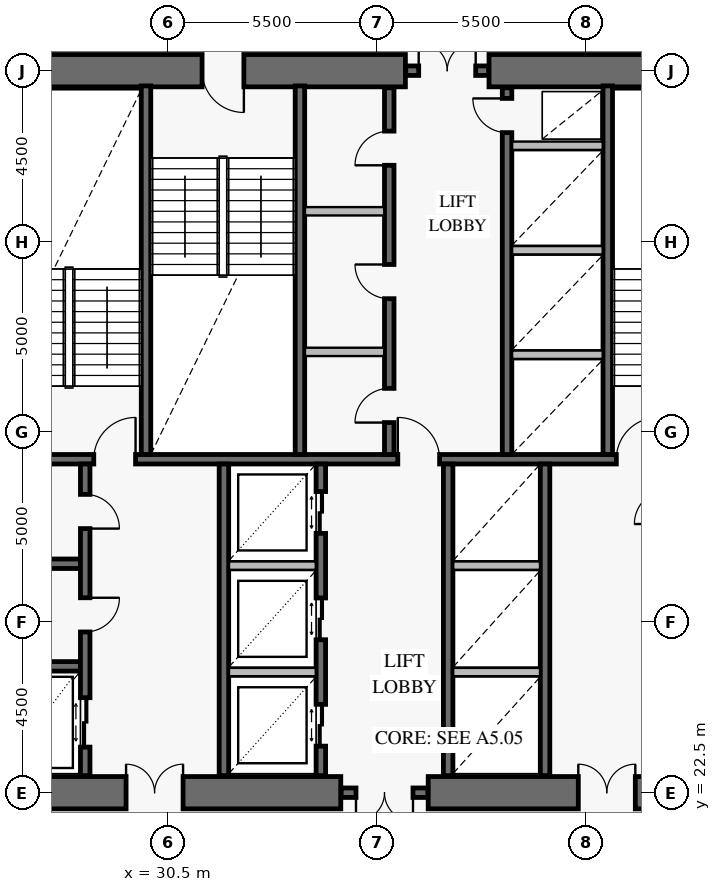
"""IFC4 building model, lengths in metres.
Left out: names, types, materials, properties, quantities, classifications, styles, units other than length and angle.
Written with IfcOpenShell. Run it as: python <this file> out.ifc"""

import sys

from ifc_helpers import new_model, si_unit, direction, frame, frame_2d, origin, place, context, subcontext, project, spatial, rectangle, extrude, element, fill, save


model = new_model("IFC4")
c1 = context("Model", 3, precision=1e-05, world=origin(), true_north=direction((0.0, 1.0)))
c2 = subcontext(c1, "Body", "Model", "MODEL_VIEW")
j1 = project(units=[si_unit("LENGTHUNIT", "METRE"), si_unit("PLANEANGLEUNIT", "RADIAN")], contexts=[c1])
p1 = place(None, origin())
s1 = spatial("IfcSite", under=j1, at=p1, CompositionType="ELEMENT")
p2 = place(p1, origin())
s2 = spatial("IfcBuilding", under=s1, at=p2, CompositionType="ELEMENT")
p3 = place(p2, frame((0.0, 0.0, 54.0)))
s3 = spatial("IfcBuildingStorey", under=s2, at=p3, CompositionType="ELEMENT", Elevation=54.0)
p4 = place(p3, frame((25.075, 22.5, 0.0), z_axis=(0.0, 0.0, 1.0), x_axis=(1.0, 0.0, 0.0)))
e1 = element("IfcWall", 1, at=p4, inside=s3, PredefinedType="SHEAR", context=c2, shape_type="SweptSolid", body=[
    extrude(rectangle(XDim=9.975, YDim=0.85, at=frame_2d((4.988, 0.0))), origin(), (0.0, 0.0, 1.0), 4.2),
])
p5 = place(p4, frame((4.325, 0.0, 0.0)))
e2 = element("IfcOpeningElement", 2, at=p5, cuts=e1, PredefinedType="OPENING", context=c2, shape_type="SweptSolid", body=[
    extrude(rectangle(XDim=1.5, YDim=2.15, at=frame_2d((0.75, 1.075))), frame((0.0, 0.437, 0.0), z_axis=(0.0, -1.0, 0.0), x_axis=(1.0, 0.0, 0.0)), (0.0, 0.0, 1.0), 0.874),
])
p6 = place(p3, frame((37.35, 22.5, 0.0), z_axis=(0.0, 0.0, 1.0), x_axis=(1.0, 0.0, 0.0)))
e3 = element("IfcWall", 3, at=p6, inside=s3, PredefinedType="SHEAR", context=c2, shape_type="SweptSolid", body=[
    extrude(rectangle(XDim=9.575, YDim=0.85, at=frame_2d((4.788, 0.0))), origin(), (0.0, 0.0, 1.0), 4.2),
])
p7 = place(p6, frame((3.95, 0.0, 0.0)))
e4 = element("IfcOpeningElement", 4, at=p7, cuts=e3, PredefinedType="OPENING", context=c2, shape_type="SweptSolid", body=[
    extrude(rectangle(XDim=1.5, YDim=2.15, at=frame_2d((0.75, 1.075))), frame((0.0, 0.437, 0.0), z_axis=(0.0, -1.0, 0.0), x_axis=(1.0, 0.0, 0.0)), (0.0, 0.0, 1.0), 0.874),
])
p8 = place(p3, frame((46.925, 41.5, 0.0), z_axis=(0.0, 0.0, 1.0), x_axis=(-1.0, 0.0, 0.0)))
e5 = element("IfcWall", 5, at=p8, inside=s3, PredefinedType="SHEAR", context=c2, shape_type="SweptSolid", body=[
    extrude(rectangle(XDim=7.975, YDim=0.85, at=frame_2d((3.988, 0.0))), origin(), (0.0, 0.0, 1.0), 4.2),
])
p9 = place(p3, frame((36.75, 41.5, 0.0), z_axis=(0.0, 0.0, 1.0), x_axis=(-1.0, 0.0, 0.0)))
e6 = element("IfcWall", 6, at=p9, inside=s3, PredefinedType="SHEAR", context=c2, shape_type="SweptSolid", body=[
    extrude(rectangle(XDim=11.675, YDim=0.85, at=frame_2d((5.837, 0.0))), origin(), (0.0, 0.0, 1.0), 4.2),
])
p10 = place(p9, frame((4.25, 0.0, 0.0)))
e7 = element("IfcOpeningElement", 7, at=p10, cuts=e6, PredefinedType="OPENING", context=c2, shape_type="SweptSolid", body=[
    extrude(rectangle(XDim=1.1, YDim=2.15, at=frame_2d((0.55, 1.075))), frame((0.0, 0.437, 0.0), z_axis=(0.0, -1.0, 0.0), x_axis=(1.0, 0.0, 0.0)), (0.0, 0.0, 1.0), 0.874),
])
p11 = place(p3, frame((35.06, 22.5, 0.0), z_axis=(0.0, 0.0, 1.0), x_axis=(1.0, 0.0, 0.0)))
e8 = element("IfcWall", 8, at=p11, inside=s3, PredefinedType="SOLIDWALL", context=c2, shape_type="SweptSolid", body=[
    extrude(rectangle(XDim=2.28, YDim=0.25, at=frame_2d((1.14, 0.0))), origin(), (0.0, 0.0, 1.0), 4.2),
])
p12 = place(p11, frame((0.39, 0.0, 0.0)))
e9 = element("IfcOpeningElement", 9, at=p12, cuts=e8, PredefinedType="OPENING", context=c2, shape_type="SweptSolid", body=[
    extrude(rectangle(XDim=1.5, YDim=2.15, at=frame_2d((0.75, 1.075))), frame((0.0, 0.137, 0.0), z_axis=(0.0, -1.0, 0.0), x_axis=(1.0, 0.0, 0.0)), (0.0, 0.0, 1.0), 0.274),
])
p13 = place(p3, frame((36.76, 41.5, 0.0), z_axis=(0.0, 0.0, 1.0), x_axis=(1.0, 0.0, 0.0)))
e10 = element("IfcWall", 10, at=p13, inside=s3, PredefinedType="SOLIDWALL", context=c2, shape_type="SweptSolid", body=[
    extrude(rectangle(XDim=2.18, YDim=0.25, at=frame_2d((1.09, 0.0))), origin(), (0.0, 0.0, 1.0), 4.2),
])
p14 = place(p13, frame((0.34, 0.0, 0.0)))
e11 = element("IfcOpeningElement", 11, at=p14, cuts=e10, PredefinedType="OPENING", context=c2, shape_type="SweptSolid", body=[
    extrude(rectangle(XDim=1.5, YDim=2.15, at=frame_2d((0.75, 1.075))), frame((0.0, 0.137, 0.0), z_axis=(0.0, -1.0, 0.0), x_axis=(1.0, 0.0, 0.0)), (0.0, 0.0, 1.0), 0.274),
])
p15 = place(p3, frame((25.95, 31.275, 0.0), z_axis=(0.0, 0.0, 1.0), x_axis=(1.0, 0.0, 0.0)))
e12 = element("IfcWall", 12, at=p15, inside=s3, PredefinedType="SOLIDWALL", context=c2, shape_type="SweptSolid", body=[
    extrude(rectangle(XDim=20.1, YDim=0.25, at=frame_2d((10.05, 0.0))), origin(), (0.0, 0.0, 1.0), 4.2),
])
p16 = place(p15, frame((2.6, 0.0, 0.0)))
e13 = element("IfcOpeningElement", 13, at=p16, cuts=e12, PredefinedType="OPENING", context=c2, shape_type="SweptSolid", body=[
    extrude(rectangle(XDim=1.1, YDim=2.15, at=frame_2d((0.55, 1.075))), frame((0.0, 0.137, 0.0), z_axis=(0.0, -1.0, 0.0), x_axis=(1.0, 0.0, 0.0)), (0.0, 0.0, 1.0), 0.274),
])
p17 = place(p15, frame((10.6, 0.0, 0.0)))
e14 = element("IfcOpeningElement", 14, at=p17, cuts=e12, PredefinedType="OPENING", context=c2, shape_type="SweptSolid", body=[
    extrude(rectangle(XDim=1.1, YDim=2.15, at=frame_2d((0.55, 1.075))), frame((0.0, 0.137, 0.0), z_axis=(0.0, -1.0, 0.0), x_axis=(1.0, 0.0, 0.0)), (0.0, 0.0, 1.0), 0.274),
])
p18 = place(p15, frame((16.35, 0.0, 0.0)))
e15 = element("IfcOpeningElement", 15, at=p18, cuts=e12, PredefinedType="OPENING", context=c2, shape_type="SweptSolid", body=[
    extrude(rectangle(XDim=1.1, YDim=2.15, at=frame_2d((0.55, 1.075))), frame((0.0, 0.137, 0.0), z_axis=(0.0, -1.0, 0.0), x_axis=(1.0, 0.0, 0.0)), (0.0, 0.0, 1.0), 0.274),
])
for number, where, z_axis, x_axis in (
    (16, (29.925, 31.4, 0.0), (0.0, 0.0, 1.0), (0.0, 1.0, 0.0)),
    (17, (33.975, 31.4, 0.0), (0.0, 0.0, 1.0), (0.0, 1.0, 0.0)),
    (18, (42.075, 31.4, 0.0), (0.0, 0.0, 1.0), (0.0, 1.0, 0.0)),
):
    element("IfcWall", number, at=place(p3, frame(where, z_axis=z_axis, x_axis=x_axis)), inside=s3, PredefinedType="SOLIDWALL", context=c2, shape_type="SweptSolid", body=[
        extrude(rectangle(XDim=9.7, YDim=0.25, at=frame_2d((4.85, 0.0))), origin(), (0.0, 0.0, 1.0), 4.2),
    ])
p19 = place(p3, frame((36.325, 31.4, 0.0), z_axis=(0.0, 0.0, 1.0), x_axis=(0.0, 1.0, 0.0)))
e19 = element("IfcWall", 19, at=p19, inside=s3, PredefinedType="SOLIDWALL", context=c2, shape_type="SweptSolid", body=[
    extrude(rectangle(XDim=9.65, YDim=0.25, at=frame_2d((4.825, 0.0))), origin(), (0.0, 0.0, 1.0), 4.2),
])
p20 = place(p19, frame((0.84, 0.0, 0.0)))
e20 = element("IfcOpeningElement", 20, at=p20, cuts=e19, PredefinedType="OPENING", context=c2, shape_type="SweptSolid", body=[
    extrude(rectangle(XDim=0.9, YDim=2.1, at=frame_2d((0.45, 1.05))), frame((0.0, 0.137, 0.0), z_axis=(0.0, -1.0, 0.0), x_axis=(1.0, 0.0, 0.0)), (0.0, 0.0, 1.0), 0.274),
])
p21 = place(p19, frame((4.1, 0.0, 0.0)))
e21 = element("IfcOpeningElement", 21, at=p21, cuts=e19, PredefinedType="OPENING", context=c2, shape_type="SweptSolid", body=[
    extrude(rectangle(XDim=0.9, YDim=2.1, at=frame_2d((0.45, 1.05))), frame((0.0, 0.137, 0.0), z_axis=(0.0, -1.0, 0.0), x_axis=(1.0, 0.0, 0.0)), (0.0, 0.0, 1.0), 0.274),
])
p22 = place(p19, frame((7.61, 0.0, 0.0)))
e22 = element("IfcOpeningElement", 22, at=p22, cuts=e19, PredefinedType="OPENING", context=c2, shape_type="SweptSolid", body=[
    extrude(rectangle(XDim=0.9, YDim=2.1, at=frame_2d((0.45, 1.05))), frame((0.0, 0.137, 0.0), z_axis=(0.0, -1.0, 0.0), x_axis=(1.0, 0.0, 0.0)), (0.0, 0.0, 1.0), 0.274),
])
p23 = place(p3, frame((39.425, 31.4, 0.0), z_axis=(0.0, 0.0, 1.0), x_axis=(0.0, 1.0, 0.0)))
e23 = element("IfcWall", 23, at=p23, inside=s3, PredefinedType="SOLIDWALL", context=c2, shape_type="SweptSolid", body=[
    extrude(rectangle(XDim=9.65, YDim=0.25, at=frame_2d((4.825, 0.0))), origin(), (0.0, 0.0, 1.0), 4.2),
])
p24 = place(p23, frame((8.47, 0.0, 0.0)))
e24 = element("IfcOpeningElement", 24, at=p24, cuts=e23, PredefinedType="OPENING", context=c2, shape_type="SweptSolid", body=[
    extrude(rectangle(XDim=0.9, YDim=2.1, at=frame_2d((0.45, 1.05))), frame((0.0, 0.137, 0.0), z_axis=(0.0, -1.0, 0.0), x_axis=(1.0, 0.0, 0.0)), (0.0, 0.0, 1.0), 0.274),
])
for number, where, z_axis, x_axis in (
    (25, (25.95, 25.825, 0.0), (0.0, 0.0, 1.0), (1.0, 0.0, 0.0)),
    (26, (25.95, 28.525, 0.0), (0.0, 0.0, 1.0), (1.0, 0.0, 0.0)),
):
    element("IfcWall", number, at=place(p3, frame(where, z_axis=z_axis, x_axis=x_axis)), inside=s3, PredefinedType="SOLIDWALL", context=c2, shape_type="SweptSolid", body=[
        extrude(rectangle(XDim=2.25, YDim=0.25, at=frame_2d((1.125, 0.0))), origin(), (0.0, 0.0, 1.0), 4.2),
    ])
p25 = place(p3, frame((28.325, 22.95, 0.0), z_axis=(0.0, 0.0, 1.0), x_axis=(0.0, 1.0, 0.0)))
e27 = element("IfcWall", 27, at=p25, inside=s3, PredefinedType="SOLIDWALL", context=c2, shape_type="SweptSolid", body=[
    extrude(rectangle(XDim=8.2, YDim=0.25, at=frame_2d((4.1, 0.0))), origin(), (0.0, 0.0, 1.0), 4.2),
])
p26 = place(p25, frame((0.75, 0.0, 0.0)))
e28 = element("IfcOpeningElement", 28, at=p26, cuts=e27, PredefinedType="OPENING", context=c2, shape_type="SweptSolid", body=[
    extrude(rectangle(XDim=1.3, YDim=2.3, at=frame_2d((0.65, 1.15))), frame((0.0, 0.137, 0.0), z_axis=(0.0, -1.0, 0.0), x_axis=(1.0, 0.0, 0.0)), (0.0, 0.0, 1.0), 0.274),
])
p27 = place(p25, frame((3.78, 0.0, 0.0)))
e29 = element("IfcOpeningElement", 29, at=p27, cuts=e27, PredefinedType="OPENING", context=c2, shape_type="SweptSolid", body=[
    extrude(rectangle(XDim=0.9, YDim=2.1, at=frame_2d((0.45, 1.05))), frame((0.0, 0.137, 0.0), z_axis=(0.0, -1.0, 0.0), x_axis=(1.0, 0.0, 0.0)), (0.0, 0.0, 1.0), 0.274),
])
p28 = place(p25, frame((6.5, 0.0, 0.0)))
e30 = element("IfcOpeningElement", 30, at=p28, cuts=e27, PredefinedType="OPENING", context=c2, shape_type="SweptSolid", body=[
    extrude(rectangle(XDim=0.9, YDim=2.1, at=frame_2d((0.45, 1.05))), frame((0.0, 0.137, 0.0), z_axis=(0.0, -1.0, 0.0), x_axis=(1.0, 0.0, 0.0)), (0.0, 0.0, 1.0), 0.274),
])
p29 = place(p3, frame((31.975, 22.95, 0.0), z_axis=(0.0, 0.0, 1.0), x_axis=(0.0, 1.0, 0.0)))
e31 = element("IfcWall", 31, at=p29, inside=s3, PredefinedType="SOLIDWALL", context=c2, shape_type="SweptSolid", body=[
    extrude(rectangle(XDim=8.2, YDim=0.25, at=frame_2d((4.1, 0.0))), origin(), (0.0, 0.0, 1.0), 4.2),
])
p30 = place(p3, frame((34.525, 22.95, 0.0), z_axis=(0.0, 0.0, 1.0), x_axis=(0.0, 1.0, 0.0)))
e32 = element("IfcWall", 32, at=p30, inside=s3, PredefinedType="SOLIDWALL", context=c2, shape_type="SweptSolid", body=[
    extrude(rectangle(XDim=8.2, YDim=0.25, at=frame_2d((4.1, 0.0))), origin(), (0.0, 0.0, 1.0), 4.2),
])
p31 = place(p30, frame((0.775, 0.0, 0.0)))
e33 = element("IfcOpeningElement", 33, at=p31, cuts=e32, PredefinedType="OPENING", context=c2, shape_type="SweptSolid", body=[
    extrude(rectangle(XDim=1.1, YDim=2.2, at=frame_2d((0.55, 1.1))), frame((0.0, 0.137, 0.0), z_axis=(0.0, -1.0, 0.0), x_axis=(1.0, 0.0, 0.0)), (0.0, 0.0, 1.0), 0.274),
])
p32 = place(p30, frame((3.575, 0.0, 0.0)))
e34 = element("IfcOpeningElement", 34, at=p32, cuts=e32, PredefinedType="OPENING", context=c2, shape_type="SweptSolid", body=[
    extrude(rectangle(XDim=1.1, YDim=2.2, at=frame_2d((0.55, 1.1))), frame((0.0, 0.137, 0.0), z_axis=(0.0, -1.0, 0.0), x_axis=(1.0, 0.0, 0.0)), (0.0, 0.0, 1.0), 0.274),
])
p33 = place(p30, frame((6.375, 0.0, 0.0)))
e35 = element("IfcOpeningElement", 35, at=p33, cuts=e32, PredefinedType="OPENING", context=c2, shape_type="SweptSolid", body=[
    extrude(rectangle(XDim=1.1, YDim=2.2, at=frame_2d((0.55, 1.1))), frame((0.0, 0.137, 0.0), z_axis=(0.0, -1.0, 0.0), x_axis=(1.0, 0.0, 0.0)), (0.0, 0.0, 1.0), 0.274),
])
for number, where, z_axis, x_axis in (
    (36, (37.875, 22.95, 0.0), (0.0, 0.0, 1.0), (0.0, 1.0, 0.0)),
    (37, (40.425, 22.95, 0.0), (0.0, 0.0, 1.0), (0.0, 1.0, 0.0)),
):
    element("IfcWall", number, at=place(p3, frame(where, z_axis=z_axis, x_axis=x_axis)), inside=s3, PredefinedType="SOLIDWALL", context=c2, shape_type="SweptSolid", body=[
        extrude(rectangle(XDim=8.2, YDim=0.25, at=frame_2d((4.1, 0.0))), origin(), (0.0, 0.0, 1.0), 4.2),
    ])
for number, where, z_axis, x_axis in (
    (38, (34.108, 34.1, 0.0), (0.0, 0.0, 1.0), (1.0, 0.0, 0.0)),
    (39, (34.108, 37.8, 0.0), (0.0, 0.0, 1.0), (1.0, 0.0, 0.0)),
):
    element("IfcWall", number, at=place(p3, frame(where, z_axis=z_axis, x_axis=x_axis)), inside=s3, PredefinedType="PARTITIONING", context=c2, shape_type="SweptSolid", body=[
        extrude(rectangle(XDim=2.084, YDim=0.22, at=frame_2d((1.042, 0.0))), origin(), (0.0, 0.0, 1.0), 3.92),
    ])
for number, where, z_axis, x_axis in (
    (40, (39.558, 34.025, 0.0), (0.0, 0.0, 1.0), (1.0, 0.0, 0.0)),
    (41, (39.558, 36.775, 0.0), (0.0, 0.0, 1.0), (1.0, 0.0, 0.0)),
    (42, (39.558, 39.525, 0.0), (0.0, 0.0, 1.0), (1.0, 0.0, 0.0)),
):
    element("IfcWall", number, at=place(p3, frame(where, z_axis=z_axis, x_axis=x_axis)), inside=s3, PredefinedType="PARTITIONING", context=c2, shape_type="SweptSolid", body=[
        extrude(rectangle(XDim=2.384, YDim=0.22, at=frame_2d((1.192, 0.0))), origin(), (0.0, 0.0, 1.0), 3.92),
    ])
for number, where, z_axis, x_axis in (
    (43, (32.108, 25.675, 0.0), (0.0, 0.0, 1.0), (1.0, 0.0, 0.0)),
    (44, (32.108, 28.475, 0.0), (0.0, 0.0, 1.0), (1.0, 0.0, 0.0)),
):
    element("IfcWall", number, at=place(p3, frame(where, z_axis=z_axis, x_axis=x_axis)), inside=s3, PredefinedType="PARTITIONING", context=c2, shape_type="SweptSolid", body=[
        extrude(rectangle(XDim=2.284, YDim=0.22, at=frame_2d((1.142, 0.0))), origin(), (0.0, 0.0, 1.0), 3.92),
    ])
for number, where, z_axis, x_axis in (
    (45, (38.008, 25.675, 0.0), (0.0, 0.0, 1.0), (1.0, 0.0, 0.0)),
    (46, (38.008, 28.475, 0.0), (0.0, 0.0, 1.0), (1.0, 0.0, 0.0)),
):
    element("IfcWall", number, at=place(p3, frame(where, z_axis=z_axis, x_axis=x_axis)), inside=s3, PredefinedType="PARTITIONING", context=c2, shape_type="SweptSolid", body=[
        extrude(rectangle(XDim=2.284, YDim=0.22, at=frame_2d((1.142, 0.0))), origin(), (0.0, 0.0, 1.0), 3.92),
    ])
p34 = place(p10, origin())
e47 = element("IfcDoor", 47, at=p34, inside=s3, OperationType="SINGLE_SWING_LEFT", PredefinedType="USERDEFINED", context=c2, shape_type="SweptSolid", body=[
    extrude(rectangle(XDim=1.1, YDim=2.15, at=frame_2d((0.55, 1.075))), frame((0.0, 0.025, 0.0), z_axis=(0.0, -1.0, 0.0), x_axis=(1.0, 0.0, 0.0)), (0.0, 0.0, 1.0), 0.05),
])
fill(e7, e47)
p35 = place(p5, origin())
e48 = element("IfcDoor", 48, at=p35, inside=s3, OperationType="DOUBLE_DOOR_SINGLE_SWING", PredefinedType="DOOR", context=c2, shape_type="SweptSolid", body=[
    extrude(rectangle(XDim=1.5, YDim=2.15, at=frame_2d((0.75, 1.075))), frame((0.0, 0.025, 0.0), z_axis=(0.0, -1.0, 0.0), x_axis=(1.0, 0.0, 0.0)), (0.0, 0.0, 1.0), 0.05),
])
fill(e2, e48)
p36 = place(p7, origin())
e49 = element("IfcDoor", 49, at=p36, inside=s3, OperationType="DOUBLE_DOOR_SINGLE_SWING", PredefinedType="DOOR", context=c2, shape_type="SweptSolid", body=[
    extrude(rectangle(XDim=1.5, YDim=2.15, at=frame_2d((0.75, 1.075))), frame((0.0, 0.025, 0.0), z_axis=(0.0, -1.0, 0.0), x_axis=(1.0, 0.0, 0.0)), (0.0, 0.0, 1.0), 0.05),
])
fill(e4, e49)
p37 = place(p12, frame((1.5, 0.0, 0.0), z_axis=(0.0, 0.0, 1.0), x_axis=(-1.0, 0.0, 0.0)))
e50 = element("IfcDoor", 50, at=p37, inside=s3, OperationType="DOUBLE_DOOR_SINGLE_SWING", PredefinedType="DOOR", context=c2, shape_type="SweptSolid", body=[
    extrude(rectangle(XDim=1.5, YDim=2.15, at=frame_2d((0.75, 1.075))), frame((0.0, 0.025, 0.0), z_axis=(0.0, -1.0, 0.0), x_axis=(1.0, 0.0, 0.0)), (0.0, 0.0, 1.0), 0.05),
])
fill(e9, e50)
p38 = place(p14, origin())
e51 = element("IfcDoor", 51, at=p38, inside=s3, OperationType="DOUBLE_DOOR_SINGLE_SWING", PredefinedType="DOOR", context=c2, shape_type="SweptSolid", body=[
    extrude(rectangle(XDim=1.5, YDim=2.15, at=frame_2d((0.75, 1.075))), frame((0.0, 0.025, 0.0), z_axis=(0.0, -1.0, 0.0), x_axis=(1.0, 0.0, 0.0)), (0.0, 0.0, 1.0), 0.05),
])
fill(e11, e51)
p39 = place(p16, origin())
e52 = element("IfcDoor", 52, at=p39, inside=s3, OperationType="SINGLE_SWING_RIGHT", PredefinedType="USERDEFINED", context=c2, shape_type="SweptSolid", body=[
    extrude(rectangle(XDim=1.1, YDim=2.15, at=frame_2d((0.55, 1.075))), frame((0.0, 0.025, 0.0), z_axis=(0.0, -1.0, 0.0), x_axis=(1.0, 0.0, 0.0)), (0.0, 0.0, 1.0), 0.05),
])
fill(e13, e52)
p40 = place(p17, origin())
e53 = element("IfcDoor", 53, at=p40, inside=s3, OperationType="SINGLE_SWING_LEFT", PredefinedType="USERDEFINED", context=c2, shape_type="SweptSolid", body=[
    extrude(rectangle(XDim=1.1, YDim=2.15, at=frame_2d((0.55, 1.075))), frame((0.0, 0.025, 0.0), z_axis=(0.0, -1.0, 0.0), x_axis=(1.0, 0.0, 0.0)), (0.0, 0.0, 1.0), 0.05),
])
fill(e14, e53)
p41 = place(p18, origin())
e54 = element("IfcDoor", 54, at=p41, inside=s3, OperationType="SINGLE_SWING_RIGHT", PredefinedType="USERDEFINED", context=c2, shape_type="SweptSolid", body=[
    extrude(rectangle(XDim=1.1, YDim=2.15, at=frame_2d((0.55, 1.075))), frame((0.0, 0.025, 0.0), z_axis=(0.0, -1.0, 0.0), x_axis=(1.0, 0.0, 0.0)), (0.0, 0.0, 1.0), 0.05),
])
fill(e15, e54)
p42 = place(p20, origin())
e55 = element("IfcDoor", 55, at=p42, inside=s3, OperationType="SINGLE_SWING_LEFT", PredefinedType="DOOR", context=c2, shape_type="SweptSolid", body=[
    extrude(rectangle(XDim=0.9, YDim=2.1, at=frame_2d((0.45, 1.05))), frame((0.0, 0.025, 0.0), z_axis=(0.0, -1.0, 0.0), x_axis=(1.0, 0.0, 0.0)), (0.0, 0.0, 1.0), 0.05),
])
fill(e20, e55)
p43 = place(p21, origin())
e56 = element("IfcDoor", 56, at=p43, inside=s3, OperationType="SINGLE_SWING_RIGHT", PredefinedType="DOOR", context=c2, shape_type="SweptSolid", body=[
    extrude(rectangle(XDim=0.9, YDim=2.1, at=frame_2d((0.45, 1.05))), frame((0.0, 0.025, 0.0), z_axis=(0.0, -1.0, 0.0), x_axis=(1.0, 0.0, 0.0)), (0.0, 0.0, 1.0), 0.05),
])
fill(e21, e56)
p44 = place(p22, origin())
e57 = element("IfcDoor", 57, at=p44, inside=s3, OperationType="SINGLE_SWING_LEFT", PredefinedType="DOOR", context=c2, shape_type="SweptSolid", body=[
    extrude(rectangle(XDim=0.9, YDim=2.1, at=frame_2d((0.45, 1.05))), frame((0.0, 0.025, 0.0), z_axis=(0.0, -1.0, 0.0), x_axis=(1.0, 0.0, 0.0)), (0.0, 0.0, 1.0), 0.05),
])
fill(e22, e57)
p45 = place(p24, origin())
e58 = element("IfcDoor", 58, at=p45, inside=s3, OperationType="SINGLE_SWING_RIGHT", PredefinedType="DOOR", context=c2, shape_type="SweptSolid", body=[
    extrude(rectangle(XDim=0.9, YDim=2.1, at=frame_2d((0.45, 1.05))), frame((0.0, 0.025, 0.0), z_axis=(0.0, -1.0, 0.0), x_axis=(1.0, 0.0, 0.0)), (0.0, 0.0, 1.0), 0.05),
])
fill(e24, e58)
p46 = place(p26, frame((1.3, 0.0, 0.0), z_axis=(0.0, 0.0, 1.0), x_axis=(-1.0, 0.0, 0.0)))
e59 = element("IfcDoor", 59, at=p46, inside=s3, OperationType="DOUBLE_DOOR_SLIDING", PredefinedType="DOOR", context=c2, shape_type="SweptSolid", body=[
    extrude(rectangle(XDim=1.3, YDim=2.3, at=frame_2d((0.65, 1.15))), frame((0.0, 0.025, 0.0), z_axis=(0.0, -1.0, 0.0), x_axis=(1.0, 0.0, 0.0)), (0.0, 0.0, 1.0), 0.05),
])
fill(e28, e59)
p47 = place(p27, frame((0.9, 0.0, 0.0), z_axis=(0.0, 0.0, 1.0), x_axis=(-1.0, 0.0, 0.0)))
e60 = element("IfcDoor", 60, at=p47, inside=s3, OperationType="SINGLE_SWING_LEFT", PredefinedType="DOOR", context=c2, shape_type="SweptSolid", body=[
    extrude(rectangle(XDim=0.9, YDim=2.1, at=frame_2d((0.45, 1.05))), frame((0.0, 0.025, 0.0), z_axis=(0.0, -1.0, 0.0), x_axis=(1.0, 0.0, 0.0)), (0.0, 0.0, 1.0), 0.05),
])
fill(e29, e60)
p48 = place(p28, frame((0.9, 0.0, 0.0), z_axis=(0.0, 0.0, 1.0), x_axis=(-1.0, 0.0, 0.0)))
e61 = element("IfcDoor", 61, at=p48, inside=s3, OperationType="SINGLE_SWING_RIGHT", PredefinedType="DOOR", context=c2, shape_type="SweptSolid", body=[
    extrude(rectangle(XDim=0.9, YDim=2.1, at=frame_2d((0.45, 1.05))), frame((0.0, 0.025, 0.0), z_axis=(0.0, -1.0, 0.0), x_axis=(1.0, 0.0, 0.0)), (0.0, 0.0, 1.0), 0.05),
])
fill(e30, e61)
p49 = place(p31, frame((1.1, 0.0, 0.0), z_axis=(0.0, 0.0, 1.0), x_axis=(-1.0, 0.0, 0.0)))
e62 = element("IfcDoor", 62, at=p49, inside=s3, OperationType="DOUBLE_DOOR_SLIDING", PredefinedType="DOOR", context=c2, shape_type="SweptSolid", body=[
    extrude(rectangle(XDim=1.1, YDim=2.2, at=frame_2d((0.55, 1.1))), frame((0.0, 0.025, 0.0), z_axis=(0.0, -1.0, 0.0), x_axis=(1.0, 0.0, 0.0)), (0.0, 0.0, 1.0), 0.05),
])
fill(e33, e62)
p50 = place(p32, frame((1.1, 0.0, 0.0), z_axis=(0.0, 0.0, 1.0), x_axis=(-1.0, 0.0, 0.0)))
e63 = element("IfcDoor", 63, at=p50, inside=s3, OperationType="DOUBLE_DOOR_SLIDING", PredefinedType="DOOR", context=c2, shape_type="SweptSolid", body=[
    extrude(rectangle(XDim=1.1, YDim=2.2, at=frame_2d((0.55, 1.1))), frame((0.0, 0.025, 0.0), z_axis=(0.0, -1.0, 0.0), x_axis=(1.0, 0.0, 0.0)), (0.0, 0.0, 1.0), 0.05),
])
fill(e34, e63)
p51 = place(p33, frame((1.1, 0.0, 0.0), z_axis=(0.0, 0.0, 1.0), x_axis=(-1.0, 0.0, 0.0)))
e64 = element("IfcDoor", 64, at=p51, inside=s3, OperationType="DOUBLE_DOOR_SLIDING", PredefinedType="DOOR", context=c2, shape_type="SweptSolid", body=[
    extrude(rectangle(XDim=1.1, YDim=2.2, at=frame_2d((0.55, 1.1))), frame((0.0, 0.025, 0.0), z_axis=(0.0, -1.0, 0.0), x_axis=(1.0, 0.0, 0.0)), (0.0, 0.0, 1.0), 0.05),
])
fill(e35, e64)
save(model, sys.argv[1])
